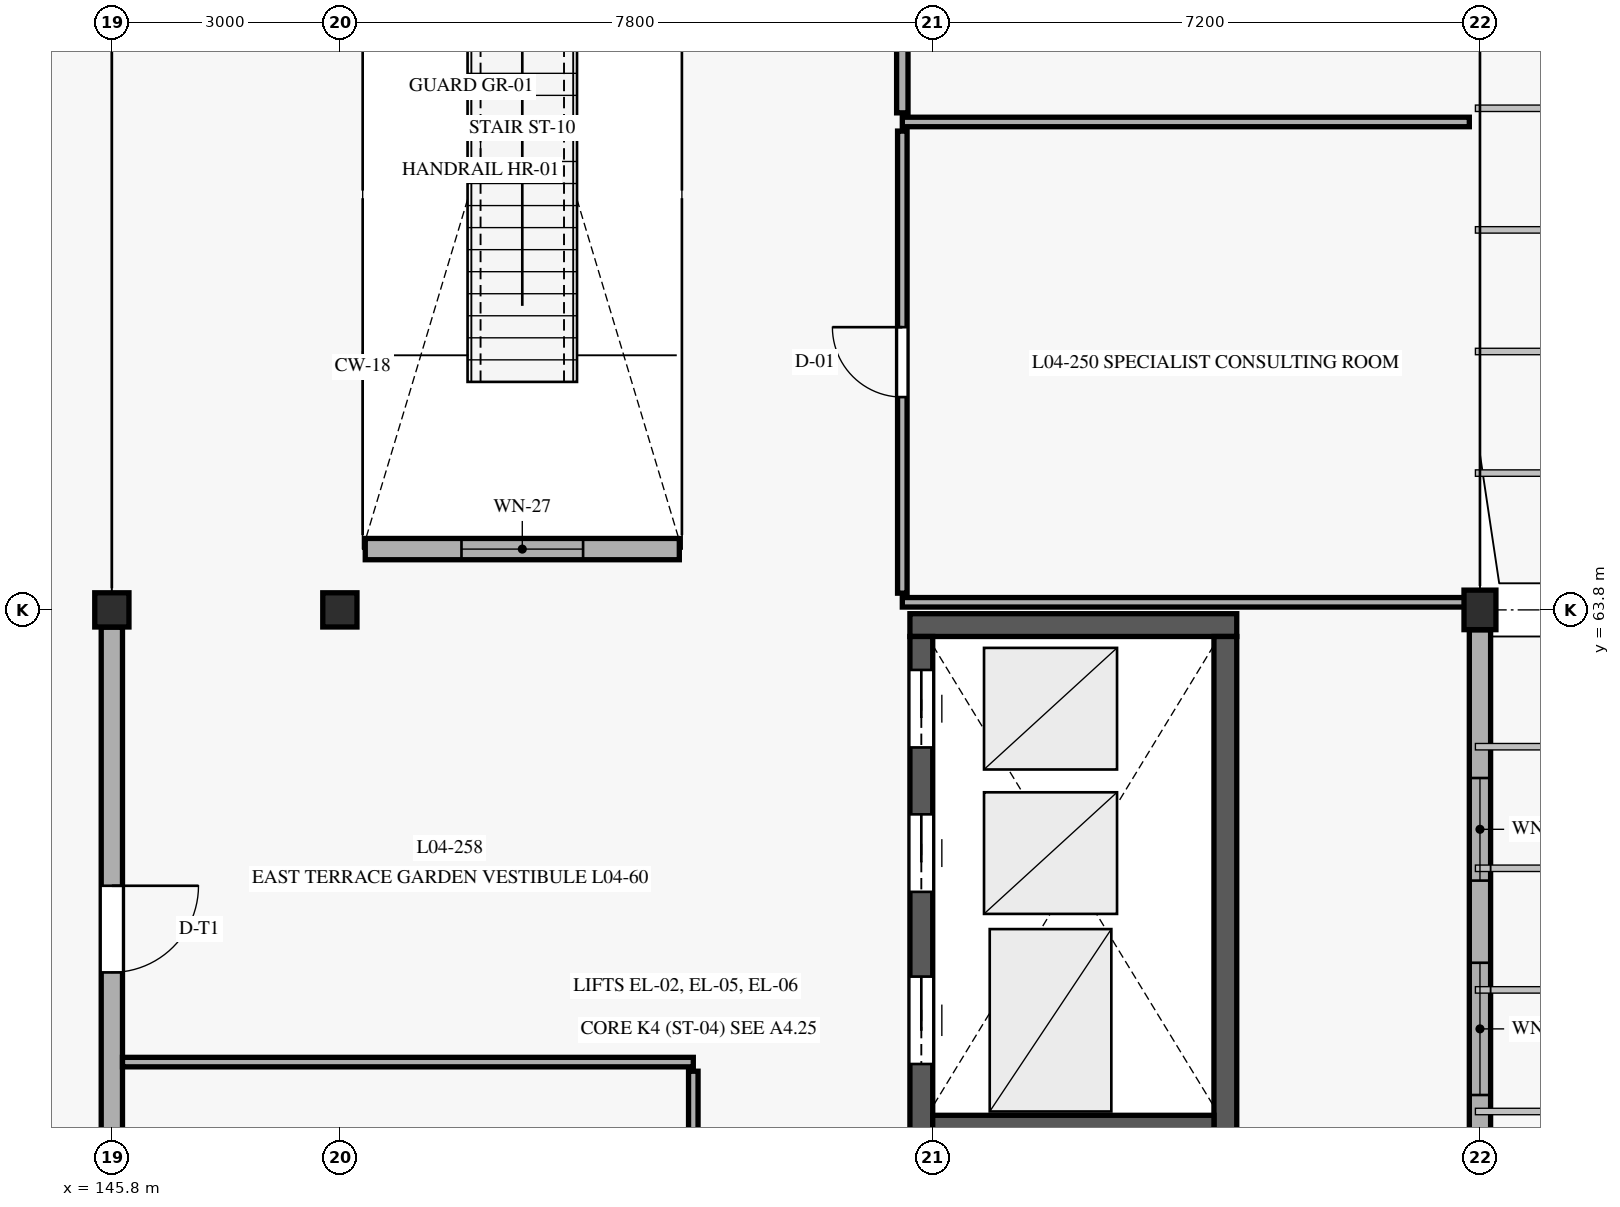
"""IFC4 building model, lengths in metres.
Left out: names, types, materials, properties, quantities, classifications, styles, units other than length and angle.
Written with IfcOpenShell. Run it as: python <this file> out.ifc"""

import sys

from ifc_helpers import new_model, si_unit, direction, frame, frame_2d, origin, origin_with_axes, origin_2d, place, context, subcontext, project, spatial, rectangle, extrude, element, fill, save


model = new_model("IFC4")
c1 = context("Model", 3, precision=1e-05, world=origin(), true_north=direction((0.0, 1.0)))
c2 = subcontext(c1, "Body", "Model", "MODEL_VIEW")
j1 = project(units=[si_unit("LENGTHUNIT", "METRE"), si_unit("PLANEANGLEUNIT", "RADIAN")], contexts=[c1])
p1 = place(None, origin())
s1 = spatial("IfcSite", under=j1, at=p1, CompositionType="ELEMENT")
p2 = place(p1, origin())
s2 = spatial("IfcBuilding", under=s1, at=p2, CompositionType="ELEMENT")
p3 = place(p2, frame((0.0, 0.0, 13.5)))
s3 = spatial("IfcBuildingStorey", under=s2, at=p3, CompositionType="ELEMENT", Elevation=13.5)
for number, where, z_axis, x_axis in (
    (1, (145.8, 63.8, 0.0), (0.0, 0.0, 1.0), (1.0, 0.0, 0.0)),
    (2, (148.8, 63.8, 0.0), (0.0, 0.0, 1.0), (1.0, 0.0, 0.0)),
):
    element("IfcColumn", number, at=place(p3, frame(where, z_axis=z_axis, x_axis=x_axis)), inside=s3, PredefinedType="COLUMN", context=c2, shape_type="SweptSolid", body=[
        extrude(rectangle(XDim=0.45, YDim=0.45, at=origin_2d()), origin(), (0.0, 0.0, 1.0), 4.05),
    ])
p4 = place(p3, frame((163.8, 63.8, 0.0), z_axis=(0.0, 0.0, 1.0), x_axis=(1.0, 0.0, 0.0)))
e3 = element("IfcColumn", 3, at=p4, inside=s3, PredefinedType="COLUMN", context=c2, shape_type="SweptSolid", body=[
    extrude(rectangle(XDim=0.42, YDim=0.52, at=origin_2d()), origin(), (0.0, 0.0, 1.0), 4.05),
])
p5 = place(p3, frame((160.6, 63.6, 0.0), z_axis=(0.0, 0.0, 1.0), x_axis=(-1.0, 0.0, 0.0)))
e4 = element("IfcWall", 4, at=p5, inside=s3, PredefinedType="SHEAR", context=c2, shape_type="SweptSolid", body=[
    extrude(rectangle(XDim=4.3, YDim=0.3, at=frame_2d((2.15, 0.0))), origin(), (0.0, 0.0, 1.0), 3.77),
])
p6 = place(p3, frame((156.45, 63.45, 0.0), z_axis=(0.0, 0.0, 1.0), x_axis=(0.0, -1.0, 0.0)))
e5 = element("IfcWall", 5, at=p6, inside=s3, PredefinedType="SHEAR", context=c2, shape_type="SweptSolid", body=[
    extrude(rectangle(XDim=13.5, YDim=0.3, at=frame_2d((6.75, 0.0))), origin(), (0.0, 0.0, 1.0), 3.77),
])
p7 = place(p6, frame((12.2, 0.0, 0.0)))
e6 = element("IfcOpeningElement", 6, at=p7, cuts=e5, PredefinedType="OPENING", context=c2, shape_type="SweptSolid", body=[
    extrude(rectangle(XDim=1.1, YDim=2.2, at=frame_2d((0.55, 1.1))), frame((0.0, 0.16, 0.0), z_axis=(0.0, -1.0, 0.0), x_axis=(1.0, 0.0, 0.0)), (0.0, 0.0, 1.0), 0.32),
])
p8 = place(p6, frame((4.475, 0.0, 0.0)))
e7 = element("IfcOpeningElement", 7, at=p8, cuts=e5, PredefinedType="OPENING", context=c2, shape_type="SweptSolid", body=[
    extrude(rectangle(XDim=1.15, YDim=2.2, at=frame_2d((0.575, 1.1))), frame((0.0, 0.16, 0.0), z_axis=(0.0, -1.0, 0.0), x_axis=(1.0, 0.0, 0.0)), (0.0, 0.0, 1.0), 0.32),
])
p9 = place(p6, frame((2.34, 0.0, 0.0)))
e8 = element("IfcOpeningElement", 8, at=p9, cuts=e5, PredefinedType="OPENING", context=c2, shape_type="SweptSolid", body=[
    extrude(rectangle(XDim=1.02, YDim=2.15, at=frame_2d((0.51, 1.075))), frame((0.0, 0.16, 0.0), z_axis=(0.0, -1.0, 0.0), x_axis=(1.0, 0.0, 0.0)), (0.0, 0.0, 1.0), 0.32),
])
p10 = place(p6, frame((0.44, 0.0, 0.0)))
e9 = element("IfcOpeningElement", 9, at=p10, cuts=e5, PredefinedType="OPENING", context=c2, shape_type="SweptSolid", body=[
    extrude(rectangle(XDim=1.02, YDim=2.15, at=frame_2d((0.51, 1.075))), frame((0.0, 0.16, 0.0), z_axis=(0.0, -1.0, 0.0), x_axis=(1.0, 0.0, 0.0)), (0.0, 0.0, 1.0), 0.32),
])
p11 = place(p3, frame((160.45, 49.95, 0.0), z_axis=(0.0, 0.0, 1.0), x_axis=(0.0, 1.0, 0.0)))
e10 = element("IfcWall", 10, at=p11, inside=s3, PredefinedType="SHEAR", context=c2, shape_type="SweptSolid", body=[
    extrude(rectangle(XDim=13.5, YDim=0.3, at=frame_2d((6.75, 0.0))), origin(), (0.0, 0.0, 1.0), 3.77),
])
p12 = place(p3, frame((156.6, 57.0, 0.0), z_axis=(0.0, 0.0, 1.0), x_axis=(1.0, 0.0, 0.0)))
e11 = element("IfcWall", 11, at=p12, inside=s3, PredefinedType="SHEAR", context=c2, shape_type="SweptSolid", body=[
    extrude(rectangle(XDim=3.7, YDim=0.3, at=frame_2d((1.85, 0.0))), origin(), (0.0, 0.0, 1.0), 3.77),
])
p13 = place(p3, frame((163.8, 55.662, 0.0), z_axis=(0.0, 0.0, 1.0), x_axis=(0.0, 1.0, 0.0)))
e12 = element("IfcWall", 12, at=p13, inside=s3, PredefinedType="SOLIDWALL", context=c2, shape_type="SweptSolid", body=[
    extrude(rectangle(XDim=7.876, YDim=0.28, at=frame_2d((3.938, 0.0))), origin(), (0.0, 0.0, 1.0), 3.42),
])
p14 = place(p13, frame((1.755, 0.0, 0.88)))
e13 = element("IfcOpeningElement", 13, at=p14, cuts=e12, PredefinedType="OPENING", context=c2, shape_type="SweptSolid", body=[
    extrude(rectangle(XDim=1.74, YDim=1.9, at=frame_2d((0.87, 0.95))), frame((0.0, 0.15, 0.0), z_axis=(0.0, -1.0, 0.0), x_axis=(1.0, 0.0, 0.0)), (0.0, 0.0, 1.0), 0.3),
])
p15 = place(p13, frame((4.576, 0.0, 0.88)))
e14 = element("IfcOpeningElement", 14, at=p15, cuts=e12, PredefinedType="OPENING", context=c2, shape_type="SweptSolid", body=[
    extrude(rectangle(XDim=1.35, YDim=1.85, at=frame_2d((0.675, 0.925))), frame((0.0, 0.15, 0.0), z_axis=(0.0, -1.0, 0.0), x_axis=(1.0, 0.0, 0.0)), (0.0, 0.0, 1.0), 0.3),
])
p16 = place(p3, frame((145.8, 63.573, 0.0), z_axis=(0.0, 0.0, 1.0), x_axis=(0.0, -1.0, 0.0)))
e15 = element("IfcWall", 15, at=p16, inside=s3, PredefinedType="SOLIDWALL", context=c2, shape_type="SweptSolid", body=[
    extrude(rectangle(XDim=7.946, YDim=0.28, at=frame_2d((3.973, 0.0))), origin(), (0.0, 0.0, 1.0), 3.34),
])
p17 = place(p16, frame((3.403, 0.0, 0.0)))
e16 = element("IfcOpeningElement", 16, at=p17, cuts=e15, PredefinedType="OPENING", context=c2, shape_type="SweptSolid", body=[
    extrude(rectangle(XDim=1.14, YDim=2.3, at=frame_2d((0.57, 1.15))), frame((0.0, 0.15, 0.0), z_axis=(0.0, -1.0, 0.0), x_axis=(1.0, 0.0, 0.0)), (0.0, 0.0, 1.0), 0.3),
])
p18 = place(p3, frame((153.266, 64.6, 0.0), z_axis=(0.0, 0.0, 1.0), x_axis=(-1.0, 0.0, 0.0)))
e17 = element("IfcWall", 17, at=p18, inside=s3, PredefinedType="SOLIDWALL", context=c2, shape_type="SweptSolid", body=[
    extrude(rectangle(XDim=4.132, YDim=0.28, at=frame_2d((2.066, 0.0))), origin(), (0.0, 0.0, 1.0), 3.77),
])
p19 = place(p18, frame((1.266, 0.0, 0.85)))
e18 = element("IfcOpeningElement", 18, at=p19, cuts=e17, PredefinedType="OPENING", context=c2, shape_type="SweptSolid", body=[
    extrude(rectangle(XDim=1.6, YDim=1.8, at=frame_2d((0.8, 0.9))), frame((0.0, 0.15, 0.0), z_axis=(0.0, -1.0, 0.0), x_axis=(1.0, 0.0, 0.0)), (0.0, 0.0, 1.0), 0.3),
])
p20 = place(p3, frame((156.2, 64.02, 0.0), z_axis=(0.0, 0.0, 1.0), x_axis=(0.0, 1.0, 0.0)))
e19 = element("IfcWall", 19, at=p20, inside=s3, PredefinedType="PARTITIONING", context=c2, shape_type="SweptSolid", body=[
    extrude(rectangle(XDim=6.08, YDim=0.125, at=frame_2d((3.04, 0.0))), origin(), (0.0, 0.0, 1.0), 3.365),
])
p21 = place(p20, frame((2.58, 0.0, 0.0)))
e20 = element("IfcOpeningElement", 20, at=p21, cuts=e19, PredefinedType="OPENING", context=c2, shape_type="SweptSolid", body=[
    extrude(rectangle(XDim=0.92, YDim=2.15, at=frame_2d((0.46, 1.075))), frame((0.0, 0.073, 0.0), z_axis=(0.0, -1.0, 0.0), x_axis=(1.0, 0.0, 0.0)), (0.0, 0.0, 1.0), 0.145),
])
p22 = place(p3, frame((156.2, 63.9, 0.0), z_axis=(0.0, 0.0, 1.0), x_axis=(1.0, 0.0, 0.0)))
e21 = element("IfcWall", 21, at=p22, inside=s3, PredefinedType="PARTITIONING", context=c2, shape_type="SweptSolid", body=[
    extrude(rectangle(XDim=7.46, YDim=0.125, at=frame_2d((3.73, 0.0))), origin(), (0.0, 0.0, 1.0), 3.365),
])
p23 = place(p3, frame((156.2, 70.22, 0.0), z_axis=(0.0, 0.0, 1.0), x_axis=(1.0, 0.0, 0.0)))
e22 = element("IfcWall", 22, at=p23, inside=s3, PredefinedType="PARTITIONING", context=c2, shape_type="SweptSolid", body=[
    extrude(rectangle(XDim=7.46, YDim=0.125, at=frame_2d((3.73, 0.0))), origin(), (0.0, 0.0, 1.0), 3.385),
])
p24 = place(p3, frame((156.2, 70.34, 0.0), z_axis=(0.0, 0.0, 1.0), x_axis=(0.0, 1.0, 0.0)))
e23 = element("IfcWall", 23, at=p24, inside=s3, PredefinedType="PARTITIONING", context=c2, shape_type="SweptSolid", body=[
    extrude(rectangle(XDim=7.91, YDim=0.15, at=frame_2d((3.955, 0.0))), origin(), (0.0, 0.0, 1.0), 3.765),
])
p25 = place(p24, frame((3.465, 0.0, 0.0)))
e24 = element("IfcOpeningElement", 24, at=p25, cuts=e23, PredefinedType="OPENING", context=c2, shape_type="SweptSolid", body=[
    extrude(rectangle(XDim=0.98, YDim=2.12, at=frame_2d((0.49, 1.06))), frame((0.0, 0.085, 0.0), z_axis=(0.0, -1.0, 0.0), x_axis=(1.0, 0.0, 0.0)), (0.0, 0.0, 1.0), 0.17),
])
p26 = place(p3, frame((153.45, 49.4, 0.0), z_axis=(0.0, 0.0, 1.0), x_axis=(0.0, 1.0, 0.0)))
e25 = element("IfcWall", 25, at=p26, inside=s3, PredefinedType="PARTITIONING", context=c2, shape_type="SweptSolid", body=[
    extrude(rectangle(XDim=8.33, YDim=0.125, at=frame_2d((4.165, 0.0))), origin(), (0.0, 0.0, 1.0), 3.365),
])
p27 = place(p26, frame((3.632, 0.0, 0.0)))
e26 = element("IfcOpeningElement", 26, at=p27, cuts=e25, PredefinedType="OPENING", context=c2, shape_type="SweptSolid", body=[
    extrude(rectangle(XDim=1.22, YDim=2.2, at=frame_2d((0.61, 1.1))), frame((0.0, 0.073, 0.0), z_axis=(0.0, -1.0, 0.0), x_axis=(1.0, 0.0, 0.0)), (0.0, 0.0, 1.0), 0.145),
])
p28 = place(p3, frame((145.94, 57.85, 0.0), z_axis=(0.0, 0.0, 1.0), x_axis=(1.0, 0.0, 0.0)))
e27 = element("IfcWall", 27, at=p28, inside=s3, PredefinedType="PARTITIONING", context=c2, shape_type="SweptSolid", body=[
    extrude(rectangle(XDim=7.51, YDim=0.125, at=frame_2d((3.755, 0.0))), origin(), (0.0, 0.0, 1.0), 3.335),
])
p29 = place(p8, origin_with_axes())
e28 = element("IfcDoor", 28, at=p29, inside=s3, OperationType="SLIDING_TO_LEFT", PredefinedType="DOOR", context=c2, shape_type="SweptSolid", body=[
    extrude(rectangle(XDim=1.15, YDim=2.2, at=frame_2d((0.575, 1.1))), frame((0.0, 0.025, 0.0), z_axis=(0.0, -1.0, 0.0), x_axis=(1.0, 0.0, 0.0)), (0.0, 0.0, 1.0), 0.05),
])
fill(e7, e28)
p30 = place(p9, origin_with_axes())
e29 = element("IfcDoor", 29, at=p30, inside=s3, OperationType="SLIDING_TO_LEFT", PredefinedType="DOOR", context=c2, shape_type="SweptSolid", body=[
    extrude(rectangle(XDim=1.02, YDim=2.15, at=frame_2d((0.51, 1.075))), frame((0.0, 0.025, 0.0), z_axis=(0.0, -1.0, 0.0), x_axis=(1.0, 0.0, 0.0)), (0.0, 0.0, 1.0), 0.05),
])
fill(e8, e29)
p31 = place(p10, origin_with_axes())
e30 = element("IfcDoor", 30, at=p31, inside=s3, OperationType="SLIDING_TO_LEFT", PredefinedType="DOOR", context=c2, shape_type="SweptSolid", body=[
    extrude(rectangle(XDim=1.02, YDim=2.15, at=frame_2d((0.51, 1.075))), frame((0.0, 0.025, 0.0), z_axis=(0.0, -1.0, 0.0), x_axis=(1.0, 0.0, 0.0)), (0.0, 0.0, 1.0), 0.05),
])
fill(e9, e30)
p32 = place(p14, origin_with_axes())
e31 = element("IfcWindow", 31, at=p32, inside=s3, PartitioningType="SINGLE_PANEL", PredefinedType="WINDOW", context=c2, shape_type="SweptSolid", body=[
    extrude(rectangle(XDim=1.74, YDim=1.9, at=frame_2d((0.87, 0.95))), frame((0.0, 0.03, 0.0), z_axis=(0.0, -1.0, 0.0), x_axis=(1.0, 0.0, 0.0)), (0.0, 0.0, 1.0), 0.06),
])
fill(e13, e31)
p33 = place(p15, origin_with_axes())
e32 = element("IfcWindow", 32, at=p33, inside=s3, PartitioningType="SINGLE_PANEL", PredefinedType="WINDOW", context=c2, shape_type="SweptSolid", body=[
    extrude(rectangle(XDim=1.35, YDim=1.85, at=frame_2d((0.675, 0.925))), frame((0.0, 0.03, 0.0), z_axis=(0.0, -1.0, 0.0), x_axis=(1.0, 0.0, 0.0)), (0.0, 0.0, 1.0), 0.06),
])
fill(e14, e32)
p34 = place(p17, frame((1.14, 0.0, 0.0), z_axis=(0.0, 0.0, 1.0), x_axis=(-1.0, 0.0, 0.0)))
e33 = element("IfcDoor", 33, at=p34, inside=s3, OperationType="SINGLE_SWING_RIGHT", PredefinedType="DOOR", context=c2, shape_type="SweptSolid", body=[
    extrude(rectangle(XDim=1.14, YDim=2.3, at=frame_2d((0.57, 1.15))), frame((0.0, 0.025, 0.0), z_axis=(0.0, -1.0, 0.0), x_axis=(1.0, 0.0, 0.0)), (0.0, 0.0, 1.0), 0.05),
])
fill(e16, e33)
p35 = place(p19, origin_with_axes())
e34 = element("IfcWindow", 34, at=p35, inside=s3, PartitioningType="SINGLE_PANEL", PredefinedType="WINDOW", context=c2, shape_type="SweptSolid", body=[
    extrude(rectangle(XDim=1.6, YDim=1.8, at=frame_2d((0.8, 0.9))), frame((0.0, 0.03, 0.0), z_axis=(0.0, -1.0, 0.0), x_axis=(1.0, 0.0, 0.0)), (0.0, 0.0, 1.0), 0.06),
])
fill(e18, e34)
p36 = place(p21, frame((0.92, 0.0, 0.0), z_axis=(0.0, 0.0, 1.0), x_axis=(-1.0, 0.0, 0.0)))
e35 = element("IfcDoor", 35, at=p36, inside=s3, OperationType="SINGLE_SWING_LEFT", PredefinedType="DOOR", context=c2, shape_type="SweptSolid", body=[
    extrude(rectangle(XDim=0.92, YDim=2.15, at=frame_2d((0.46, 1.075))), frame((0.0, 0.025, 0.0), z_axis=(0.0, -1.0, 0.0), x_axis=(1.0, 0.0, 0.0)), (0.0, 0.0, 1.0), 0.05),
])
fill(e20, e35)
save(model, sys.argv[1])
